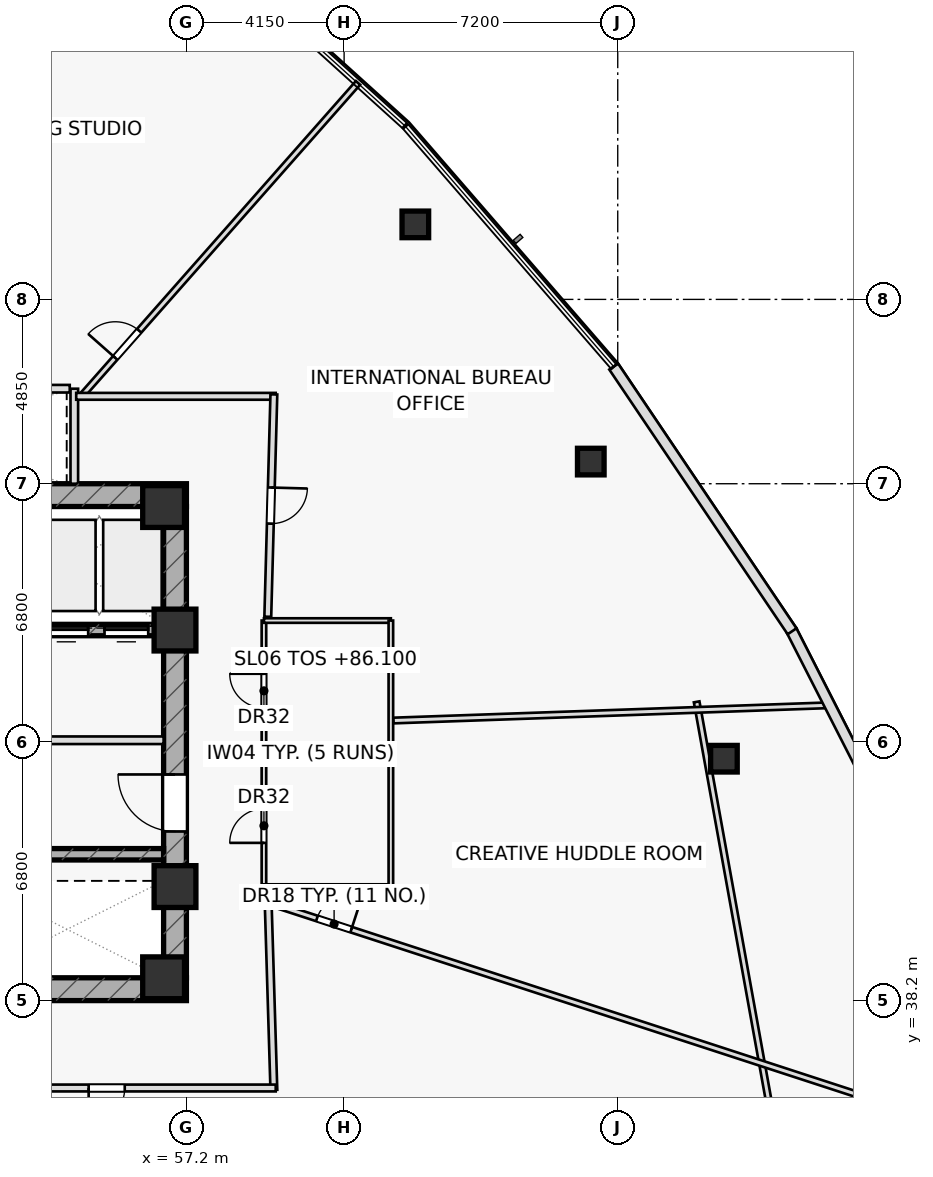
"""IFC4 building model, lengths in metres.
Left out: names, types, materials, properties, quantities, classifications, styles, units other than length and angle.
Written with IfcOpenShell. Run it as: python <this file> out.ifc"""

import sys

from ifc_helpers import new_model, si_unit, direction, frame, frame_2d, origin, origin_2d, place, context, subcontext, project, spatial, rectangle, hollow_rectangle, extrude, element, fill, save


model = new_model("IFC4")
c1 = context("Model", 3, precision=1e-05, world=origin(), true_north=direction((0.0, 1.0)))
c2 = subcontext(c1, "Body", "Model", "MODEL_VIEW")
j1 = project(units=[si_unit("LENGTHUNIT", "METRE"), si_unit("PLANEANGLEUNIT", "RADIAN")], contexts=[c1])
p1 = place(None, origin())
s1 = spatial("IfcSite", under=j1, at=p1, CompositionType="ELEMENT")
p2 = place(p1, origin())
s2 = spatial("IfcBuilding", under=s1, at=p2, CompositionType="ELEMENT")
p3 = place(p2, frame((0.0, 0.0, 86.1)))
s3 = spatial("IfcBuildingStorey", under=s2, at=p3, CompositionType="ELEMENT", Elevation=86.1)
p4 = place(p3, frame((42.8, 51.5, 0.0), z_axis=(0.0, 0.0, 1.0), x_axis=(1.0, 0.0, 0.0)))
e1 = element("IfcWall", 1, at=p4, inside=s3, PredefinedType="SHEAR", context=c2, shape_type="SweptSolid", body=[
    extrude(rectangle(XDim=14.4, YDim=0.6, at=frame_2d((7.2, 0.0))), origin(), (0.0, 0.0, 1.0), 3.6),
])
p5 = place(p4, frame((0.88, 0.0, 0.0)))
e2 = element("IfcOpeningElement", 2, at=p5, cuts=e1, PredefinedType="OPENING", context=c2, shape_type="SweptSolid", body=[
    extrude(rectangle(XDim=1.05, YDim=2.2, at=frame_2d((0.525, 1.1))), frame((0.0, 0.31, 0.0), z_axis=(0.0, -1.0, 0.0), x_axis=(1.0, 0.0, 0.0)), (0.0, 0.0, 1.0), 0.62),
])
p6 = place(p3, frame((42.8, 38.5, 0.0), z_axis=(0.0, 0.0, 1.0), x_axis=(1.0, 0.0, 0.0)))
e3 = element("IfcWall", 3, at=p6, inside=s3, PredefinedType="SHEAR", context=c2, shape_type="SweptSolid", body=[
    extrude(rectangle(XDim=14.4, YDim=0.6, at=frame_2d((7.2, 0.0))), origin(), (0.0, 0.0, 1.0), 3.6),
])
p7 = place(p6, frame((0.88, 0.0, 0.0)))
e4 = element("IfcOpeningElement", 4, at=p7, cuts=e3, PredefinedType="OPENING", context=c2, shape_type="SweptSolid", body=[
    extrude(rectangle(XDim=1.05, YDim=2.2, at=frame_2d((0.525, 1.1))), frame((0.0, 0.31, 0.0), z_axis=(0.0, -1.0, 0.0), x_axis=(1.0, 0.0, 0.0)), (0.0, 0.0, 1.0), 0.62),
])
p8 = place(p3, frame((56.9, 38.8, 0.0), z_axis=(0.0, 0.0, 1.0), x_axis=(0.0, 1.0, 0.0)))
e5 = element("IfcWall", 5, at=p8, inside=s3, PredefinedType="SHEAR", context=c2, shape_type="SweptSolid", body=[
    extrude(rectangle(XDim=12.4, YDim=0.6, at=frame_2d((6.2, 0.0))), origin(), (0.0, 0.0, 1.0), 3.6),
])
p9 = place(p8, frame((3.85, 0.0, 0.0)))
e6 = element("IfcOpeningElement", 6, at=p9, cuts=e5, PredefinedType="OPENING", context=c2, shape_type="SweptSolid", body=[
    extrude(rectangle(XDim=1.5, YDim=2.2, at=frame_2d((0.75, 1.1))), frame((0.0, 0.31, 0.0), z_axis=(0.0, -1.0, 0.0), x_axis=(1.0, 0.0, 0.0)), (0.0, 0.0, 1.0), 0.62),
])
p10 = place(p3, frame((43.4, 47.95, 0.0), z_axis=(0.0, 0.0, 1.0), x_axis=(1.0, 0.0, 0.0)))
e7 = element("IfcWall", 7, at=p10, inside=s3, PredefinedType="SHEAR", context=c2, shape_type="SweptSolid", body=[
    extrude(rectangle(XDim=13.2, YDim=0.3, at=frame_2d((6.6, 0.0))), origin(), (0.0, 0.0, 1.0), 3.6),
])
p11 = place(p10, frame((8.345, 0.0, 0.0)))
e8 = element("IfcOpeningElement", 8, at=p11, cuts=e7, PredefinedType="OPENING", context=c2, shape_type="SweptSolid", body=[
    extrude(rectangle(XDim=1.15, YDim=2.2, at=frame_2d((0.575, 1.1))), frame((0.0, 0.16, 0.0), z_axis=(0.0, -1.0, 0.0), x_axis=(1.0, 0.0, 0.0)), (0.0, 0.0, 1.0), 0.32),
])
p12 = place(p10, frame((10.065, 0.0, 0.0)))
e9 = element("IfcOpeningElement", 9, at=p12, cuts=e7, PredefinedType="OPENING", context=c2, shape_type="SweptSolid", body=[
    extrude(rectangle(XDim=1.15, YDim=2.2, at=frame_2d((0.575, 1.1))), frame((0.0, 0.16, 0.0), z_axis=(0.0, -1.0, 0.0), x_axis=(1.0, 0.0, 0.0)), (0.0, 0.0, 1.0), 0.32),
])
p13 = place(p10, frame((11.645, 0.0, 0.0)))
e10 = element("IfcOpeningElement", 10, at=p13, cuts=e7, PredefinedType="OPENING", context=c2, shape_type="SweptSolid", body=[
    extrude(rectangle(XDim=1.15, YDim=2.2, at=frame_2d((0.575, 1.1))), frame((0.0, 0.16, 0.0), z_axis=(0.0, -1.0, 0.0), x_axis=(1.0, 0.0, 0.0)), (0.0, 0.0, 1.0), 0.32),
])
p14 = place(p3, frame((43.4, 42.05, 0.0), z_axis=(0.0, 0.0, 1.0), x_axis=(1.0, 0.0, 0.0)))
e11 = element("IfcWall", 11, at=p14, inside=s3, PredefinedType="SHEAR", context=c2, shape_type="SweptSolid", body=[
    extrude(rectangle(XDim=13.2, YDim=0.3, at=frame_2d((6.6, 0.0))), origin(), (0.0, 0.0, 1.0), 3.6),
])
for number, where, z_axis, x_axis in (
    (12, (56.9, 47.95, 0.0), (0.0, 0.0, 1.0), (1.0, 0.0, 0.0)),
    (13, (56.6, 51.2, 0.0), (0.0, 0.0, 1.0), (1.0, 0.0, 0.0)),
    (14, (56.9, 41.2, 0.0), (0.0, 0.0, 1.0), (1.0, 0.0, 0.0)),
    (15, (56.6, 38.8, 0.0), (0.0, 0.0, 1.0), (1.0, 0.0, 0.0)),
):
    element("IfcColumn", number, at=place(p3, frame(where, z_axis=z_axis, x_axis=x_axis)), inside=s3, PredefinedType="COLUMN", context=c2, shape_type="SweptSolid", body=[
        extrude(rectangle(XDim=1.1, YDim=1.1, at=origin_2d()), origin(), (0.0, 0.0, 1.0), 3.6),
    ])
for number, where, z_axis, x_axis in (
    (16, (71.344, 44.565, 0.0), (0.0, 0.0, 1.0), (1.0, 0.0, 0.0)),
    (17, (67.841, 52.383, 0.0), (0.0, 0.0, 1.0), (1.0, 0.0, 0.0)),
    (18, (63.224, 58.624, 0.0), (0.0, 0.0, 1.0), (1.0, 0.0, 0.0)),
):
    element("IfcColumn", number, at=place(p3, frame(where, z_axis=z_axis, x_axis=x_axis)), inside=s3, PredefinedType="COLUMN", context=c2, shape_type="SweptSolid", body=[
        extrude(hollow_rectangle(XDim=0.7, YDim=0.7, WallThickness=0.04, at=origin_2d()), origin(), (0.0, 0.0, 1.0), 3.6),
    ])
p15 = place(p3, frame((54.25, 51.8, 0.0), z_axis=(0.0, 0.0, 1.0), x_axis=(0.0, 1.0, 0.0)))
e19 = element("IfcWall", 19, at=p15, inside=s3, PredefinedType="PARTITIONING", context=c2, shape_type="SweptSolid", body=[
    extrude(rectangle(XDim=2.5, YDim=0.2, at=frame_2d((1.25, 0.0))), origin(), (0.0, 0.0, 1.0), 3.6),
])
p16 = place(p3, frame((50.65, 45.05, 0.0), z_axis=(0.0, 0.0, 1.0), x_axis=(1.0, 0.0, 0.0)))
e20 = element("IfcWall", 20, at=p16, inside=s3, PredefinedType="PARTITIONING", context=c2, shape_type="SweptSolid", body=[
    extrude(rectangle(XDim=5.95, YDim=0.2, at=frame_2d((2.975, 0.0))), origin(), (0.0, 0.0, 1.0), 3.6),
])
p17 = place(p16, frame((1.35, 0.0, 0.0)))
e21 = element("IfcOpeningElement", 21, at=p17, cuts=e20, PredefinedType="OPENING", context=c2, shape_type="SweptSolid", body=[
    extrude(rectangle(XDim=1.5, YDim=2.2, at=frame_2d((0.75, 1.1))), frame((0.0, 0.11, 0.0), z_axis=(0.0, -1.0, 0.0), x_axis=(1.0, 0.0, 0.0)), (0.0, 0.0, 1.0), 0.22),
])
p18 = place(p3, frame((72.969, 33.091, 0.0), z_axis=(0.0, 0.0, 1.0), x_axis=(-0.177742578179, 0.984077017261, 0.0)))
e22 = element("IfcWall", 22, at=p18, inside=s3, PredefinedType="PARTITIONING", context=c2, shape_type="SweptSolid", body=[
    extrude(rectangle(XDim=13.179, YDim=0.15, at=frame_2d((6.59, 0.0))), origin(), (0.0, 0.0, 1.0), 2.975),
])
p19 = place(p3, frame((59.24, 41.2, 0.0), z_axis=(0.0, 0.0, 1.0), x_axis=(0.0, 1.0, 0.0)))
e23 = element("IfcWall", 23, at=p19, inside=s3, PredefinedType="PARTITIONING", context=c2, shape_type="SweptSolid", body=[
    extrude(rectangle(XDim=7.0, YDim=0.12, at=frame_2d((3.5, 0.0))), origin(), (0.0, 0.0, 1.0), 3.6),
])
p20 = place(p19, frame((1.15, 0.0, 0.0)))
e24 = element("IfcOpeningElement", 24, at=p20, cuts=e23, PredefinedType="OPENING", context=c2, shape_type="SweptSolid", body=[
    extrude(rectangle(XDim=0.9, YDim=2.05, at=frame_2d((0.45, 1.025))), frame((0.0, 0.07, 0.0), z_axis=(0.0, -1.0, 0.0), x_axis=(1.0, 0.0, 0.0)), (0.0, 0.0, 1.0), 0.14),
])
p21 = place(p19, frame((4.7, 0.0, 0.0)))
e25 = element("IfcOpeningElement", 25, at=p21, cuts=e23, PredefinedType="OPENING", context=c2, shape_type="SweptSolid", body=[
    extrude(rectangle(XDim=0.9, YDim=2.05, at=frame_2d((0.45, 1.025))), frame((0.0, 0.07, 0.0), z_axis=(0.0, -1.0, 0.0), x_axis=(1.0, 0.0, 0.0)), (0.0, 0.0, 1.0), 0.14),
])
p22 = place(p3, frame((59.24, 41.2, 0.0), z_axis=(0.0, 0.0, 1.0), x_axis=(1.0, 0.0, 0.0)))
e26 = element("IfcWall", 26, at=p22, inside=s3, PredefinedType="PARTITIONING", context=c2, shape_type="SweptSolid", body=[
    extrude(rectangle(XDim=3.34, YDim=0.12, at=frame_2d((1.67, 0.0))), origin(), (0.0, 0.0, 1.0), 2.975),
])
for number, where, z_axis, x_axis in (
    (27, (59.24, 44.65, 0.0), (0.0, 0.0, 1.0), (1.0, 0.0, 0.0)),
    (28, (59.24, 48.2, 0.0), (0.0, 0.0, 1.0), (1.0, 0.0, 0.0)),
):
    element("IfcWall", number, at=place(p3, frame(where, z_axis=z_axis, x_axis=x_axis)), inside=s3, PredefinedType="PARTITIONING", context=c2, shape_type="SweptSolid", body=[
        extrude(rectangle(XDim=3.34, YDim=0.12, at=frame_2d((1.67, 0.0))), origin(), (0.0, 0.0, 1.0), 3.6),
    ])
p23 = place(p3, frame((62.58, 41.2, 0.0), z_axis=(0.0, 0.0, 1.0), x_axis=(0.0, 1.0, 0.0)))
e29 = element("IfcWall", 29, at=p23, inside=s3, PredefinedType="PARTITIONING", context=c2, shape_type="SweptSolid", body=[
    extrude(rectangle(XDim=7.0, YDim=0.12, at=frame_2d((3.5, 0.0))), origin(), (0.0, 0.0, 1.0), 3.6),
])
p24 = place(p3, frame((50.829, 35.9, 0.0), z_axis=(0.0, 0.0, 1.0), x_axis=(0.437604942245, -0.899167345116, 0.0)))
e30 = element("IfcWall", 30, at=p24, inside=s3, PredefinedType="PARTITIONING", context=c2, shape_type="SweptSolid", body=[
    extrude(rectangle(XDim=15.367, YDim=0.15, at=frame_2d((7.684, 0.0))), origin(), (0.0, 0.0, 1.0), 3.025),
])
p25 = place(p3, frame((59.351, 40.779, 0.0), z_axis=(0.0, 0.0, 1.0), x_axis=(0.950783281681, -0.309856662468, 0.0)))
e31 = element("IfcWall", 31, at=p25, inside=s3, PredefinedType="PARTITIONING", context=c2, shape_type="SweptSolid", body=[
    extrude(rectangle(XDim=18.495, YDim=0.15, at=frame_2d((9.247, 0.0))), origin(), (0.0, 0.0, 1.0), 2.975),
])
p26 = place(p25, frame((1.35, 0.0, 0.0)))
e32 = element("IfcOpeningElement", 32, at=p26, cuts=e31, PredefinedType="OPENING", context=c2, shape_type="SweptSolid", body=[
    extrude(rectangle(XDim=0.95, YDim=2.05, at=frame_2d((0.475, 1.025))), frame((0.0, 0.085, 0.0), z_axis=(0.0, -1.0, 0.0), x_axis=(1.0, 0.0, 0.0)), (0.0, 0.0, 1.0), 0.17),
])
p27 = place(p3, frame((62.65, 45.569, 0.0), z_axis=(0.0, 0.0, 1.0), x_axis=(0.999386624809, 0.035019625243, 0.0)))
e33 = element("IfcWall", 33, at=p27, inside=s3, PredefinedType="PARTITIONING", context=c2, shape_type="SweptSolid", body=[
    extrude(rectangle(XDim=11.496, YDim=0.15, at=frame_2d((5.748, 0.0))), origin(), (0.0, 0.0, 1.0), 3.025),
])
p28 = place(p3, frame((54.435, 54.1, 0.0), z_axis=(0.0, 0.0, 1.0), x_axis=(0.661869690786, 0.74961891146, 0.0)))
e34 = element("IfcWall", 34, at=p28, inside=s3, PredefinedType="PARTITIONING", context=c2, shape_type="SweptSolid", body=[
    extrude(rectangle(XDim=11.001, YDim=0.15, at=frame_2d((5.5, 0.0))), origin(), (0.0, 0.0, 1.0), 2.975),
])
p29 = place(p28, frame((1.35, 0.0, 0.0)))
e35 = element("IfcOpeningElement", 35, at=p29, cuts=e34, PredefinedType="OPENING", context=c2, shape_type="SweptSolid", body=[
    extrude(rectangle(XDim=0.95, YDim=2.05, at=frame_2d((0.475, 1.025))), frame((0.0, 0.085, 0.0), z_axis=(0.0, -1.0, 0.0), x_axis=(1.0, 0.0, 0.0)), (0.0, 0.0, 1.0), 0.17),
])
p30 = place(p3, frame((54.3, 54.1, 0.0), z_axis=(0.0, 0.0, 1.0), x_axis=(1.0, 0.0, 0.0)))
e36 = element("IfcWall", 36, at=p30, inside=s3, PredefinedType="PARTITIONING", context=c2, shape_type="SweptSolid", body=[
    extrude(rectangle(XDim=5.25, YDim=0.18, at=frame_2d((2.625, 0.0))), origin(), (0.0, 0.0, 1.0), 2.975),
])
p31 = place(p3, frame((59.501, 54.15, 0.0), z_axis=(0.0, 0.0, 1.0), x_axis=(-0.027367567602, -0.999625437973, 0.0)))
e37 = element("IfcWall", 37, at=p31, inside=s3, PredefinedType="PARTITIONING", context=c2, shape_type="SweptSolid", body=[
    extrude(rectangle(XDim=5.852, YDim=0.18, at=frame_2d((2.926, 0.0))), origin(), (0.0, 0.0, 1.0), 2.975),
])
p32 = place(p31, frame((2.451, 0.0, 0.0)))
e38 = element("IfcOpeningElement", 38, at=p32, cuts=e37, PredefinedType="OPENING", context=c2, shape_type="SweptSolid", body=[
    extrude(rectangle(XDim=0.95, YDim=2.05, at=frame_2d((0.475, 1.025))), frame((0.0, 0.1, 0.0), z_axis=(0.0, -1.0, 0.0), x_axis=(1.0, 0.0, 0.0)), (0.0, 0.0, 1.0), 0.2),
])
p33 = place(p3, frame((59.342, 41.1, 0.0), z_axis=(0.0, 0.0, 1.0), x_axis=(0.030445329425, -0.999536433511, 0.0)))
e39 = element("IfcWall", 39, at=p33, inside=s3, PredefinedType="PARTITIONING", context=c2, shape_type="SweptSolid", body=[
    extrude(rectangle(XDim=5.252, YDim=0.18, at=frame_2d((2.626, 0.0))), origin(), (0.0, 0.0, 1.0), 2.975),
])
p34 = place(p3, frame((59.55, 35.9, 0.0), z_axis=(0.0, 0.0, 1.0), x_axis=(-1.0, 0.0, 0.0)))
e40 = element("IfcWall", 40, at=p34, inside=s3, PredefinedType="PARTITIONING", context=c2, shape_type="SweptSolid", body=[
    extrude(rectangle(XDim=22.05, YDim=0.18, at=frame_2d((11.025, 0.0))), origin(), (0.0, 0.0, 1.0), 2.975),
])
p35 = place(p34, frame((3.972, 0.0, 0.0)))
e41 = element("IfcOpeningElement", 41, at=p35, cuts=e40, PredefinedType="OPENING", context=c2, shape_type="SweptSolid", body=[
    extrude(rectangle(XDim=0.95, YDim=2.05, at=frame_2d((0.475, 1.025))), frame((0.0, 0.1, 0.0), z_axis=(0.0, -1.0, 0.0), x_axis=(1.0, 0.0, 0.0)), (0.0, 0.0, 1.0), 0.2),
])
p36 = place(p34, frame((10.039, 0.0, 0.0)))
e42 = element("IfcOpeningElement", 42, at=p36, cuts=e40, PredefinedType="OPENING", context=c2, shape_type="SweptSolid", body=[
    extrude(rectangle(XDim=0.95, YDim=2.05, at=frame_2d((0.475, 1.025))), frame((0.0, 0.1, 0.0), z_axis=(0.0, -1.0, 0.0), x_axis=(1.0, 0.0, 0.0)), (0.0, 0.0, 1.0), 0.2),
])
p37 = place(p34, frame((14.606, 0.0, 0.0)))
e43 = element("IfcOpeningElement", 43, at=p37, cuts=e40, PredefinedType="OPENING", context=c2, shape_type="SweptSolid", body=[
    extrude(rectangle(XDim=0.95, YDim=2.05, at=frame_2d((0.475, 1.025))), frame((0.0, 0.1, 0.0), z_axis=(0.0, -1.0, 0.0), x_axis=(1.0, 0.0, 0.0)), (0.0, 0.0, 1.0), 0.2),
])
p38 = place(p3, frame((76.944, 40.45, 0.0), z_axis=(0.0, 0.0, 1.0), x_axis=(-0.454362243703, 0.890817013476, 0.0)))
e44 = element("IfcWall", 44, at=p38, inside=s3, PredefinedType="STANDARD", context=c2, shape_type="SweptSolid", body=[
    extrude(rectangle(XDim=8.412, YDim=0.28, at=frame_2d((4.206, 0.0))), origin(), (0.0, 0.0, 1.0), 3.6),
])
p39 = place(p3, frame((73.137, 47.917, 0.0), z_axis=(0.0, 0.0, 1.0), x_axis=(-0.558811747719, 0.829294537913, 0.0)))
e45 = element("IfcWall", 45, at=p39, inside=s3, PredefinedType="STANDARD", context=c2, shape_type="SweptSolid", body=[
    extrude(rectangle(XDim=8.4, YDim=0.28, at=frame_2d((4.2, 0.0))), origin(), (0.0, 0.0, 1.0), 3.6),
])
p40 = place(p3, frame((45.82, 54.3, 0.0), z_axis=(0.0, 0.0, 1.0), x_axis=(1.0, 0.0, 0.0)))
e46 = element("IfcWall", 46, at=p40, inside=s3, PredefinedType="PARTITIONING", context=c2, shape_type="SweptSolid", body=[
    extrude(rectangle(XDim=8.31, YDim=0.2, at=frame_2d((4.155, 0.0))), origin(), (0.0, 0.0, 1.0), 3.6),
])
p41 = place(p9, origin())
e47 = element("IfcDoor", 47, at=p41, inside=s3, OperationType="SINGLE_SWING_RIGHT", PredefinedType="DOOR", context=c2, shape_type="SweptSolid", body=[
    extrude(rectangle(XDim=1.5, YDim=2.2, at=frame_2d((0.75, 1.1))), frame((0.0, 0.025, 0.0), z_axis=(0.0, -1.0, 0.0), x_axis=(1.0, 0.0, 0.0)), (0.0, 0.0, 1.0), 0.05),
])
fill(e6, e47)
p42 = place(p20, origin())
e48 = element("IfcDoor", 48, at=p42, inside=s3, OperationType="SINGLE_SWING_LEFT", PredefinedType="DOOR", context=c2, shape_type="SweptSolid", body=[
    extrude(rectangle(XDim=0.9, YDim=2.05, at=frame_2d((0.45, 1.025))), frame((0.0, 0.025, 0.0), z_axis=(0.0, -1.0, 0.0), x_axis=(1.0, 0.0, 0.0)), (0.0, 0.0, 1.0), 0.05),
])
fill(e24, e48)
p43 = place(p21, origin())
e49 = element("IfcDoor", 49, at=p43, inside=s3, OperationType="SINGLE_SWING_RIGHT", PredefinedType="DOOR", context=c2, shape_type="SweptSolid", body=[
    extrude(rectangle(XDim=0.9, YDim=2.05, at=frame_2d((0.45, 1.025))), frame((0.0, 0.025, 0.0), z_axis=(0.0, -1.0, 0.0), x_axis=(1.0, 0.0, 0.0)), (0.0, 0.0, 1.0), 0.05),
])
fill(e25, e49)
p44 = place(p26, origin())
e50 = element("IfcDoor", 50, at=p44, inside=s3, OperationType="SINGLE_SWING_RIGHT", PredefinedType="DOOR", context=c2, shape_type="SweptSolid", body=[
    extrude(rectangle(XDim=0.95, YDim=2.05, at=frame_2d((0.475, 1.025))), frame((0.0, 0.025, 0.0), z_axis=(0.0, -1.0, 0.0), x_axis=(1.0, 0.0, 0.0)), (0.0, 0.0, 1.0), 0.05),
])
fill(e32, e50)
p45 = place(p29, origin())
e51 = element("IfcDoor", 51, at=p45, inside=s3, OperationType="SINGLE_SWING_LEFT", PredefinedType="DOOR", context=c2, shape_type="SweptSolid", body=[
    extrude(rectangle(XDim=0.95, YDim=2.05, at=frame_2d((0.475, 1.025))), frame((0.0, 0.025, 0.0), z_axis=(0.0, -1.0, 0.0), x_axis=(1.0, 0.0, 0.0)), (0.0, 0.0, 1.0), 0.05),
])
fill(e35, e51)
p46 = place(p32, origin())
e52 = element("IfcDoor", 52, at=p46, inside=s3, OperationType="SINGLE_SWING_LEFT", PredefinedType="DOOR", context=c2, shape_type="SweptSolid", body=[
    extrude(rectangle(XDim=0.95, YDim=2.05, at=frame_2d((0.475, 1.025))), frame((0.0, 0.025, 0.0), z_axis=(0.0, -1.0, 0.0), x_axis=(1.0, 0.0, 0.0)), (0.0, 0.0, 1.0), 0.05),
])
fill(e38, e52)
p47 = place(p35, origin())
e53 = element("IfcDoor", 53, at=p47, inside=s3, OperationType="SINGLE_SWING_RIGHT", PredefinedType="DOOR", context=c2, shape_type="SweptSolid", body=[
    extrude(rectangle(XDim=0.95, YDim=2.05, at=frame_2d((0.475, 1.025))), frame((0.0, 0.025, 0.0), z_axis=(0.0, -1.0, 0.0), x_axis=(1.0, 0.0, 0.0)), (0.0, 0.0, 1.0), 0.05),
])
fill(e41, e53)
p48 = place(p12, origin())
e54 = element("IfcDoor", 54, at=p48, inside=s3, OperationType="SLIDING_TO_LEFT", PredefinedType="DOOR", context=c2, shape_type="SweptSolid", body=[
    extrude(rectangle(XDim=1.15, YDim=2.2, at=frame_2d((0.575, 1.1))), frame((0.0, 0.025, 0.0), z_axis=(0.0, -1.0, 0.0), x_axis=(1.0, 0.0, 0.0)), (0.0, 0.0, 1.0), 0.05),
])
fill(e9, e54)
p49 = place(p13, origin())
e55 = element("IfcDoor", 55, at=p49, inside=s3, OperationType="SLIDING_TO_LEFT", PredefinedType="DOOR", context=c2, shape_type="SweptSolid", body=[
    extrude(rectangle(XDim=1.15, YDim=2.2, at=frame_2d((0.575, 1.1))), frame((0.0, 0.025, 0.0), z_axis=(0.0, -1.0, 0.0), x_axis=(1.0, 0.0, 0.0)), (0.0, 0.0, 1.0), 0.05),
])
fill(e10, e55)
save(model, sys.argv[1])
